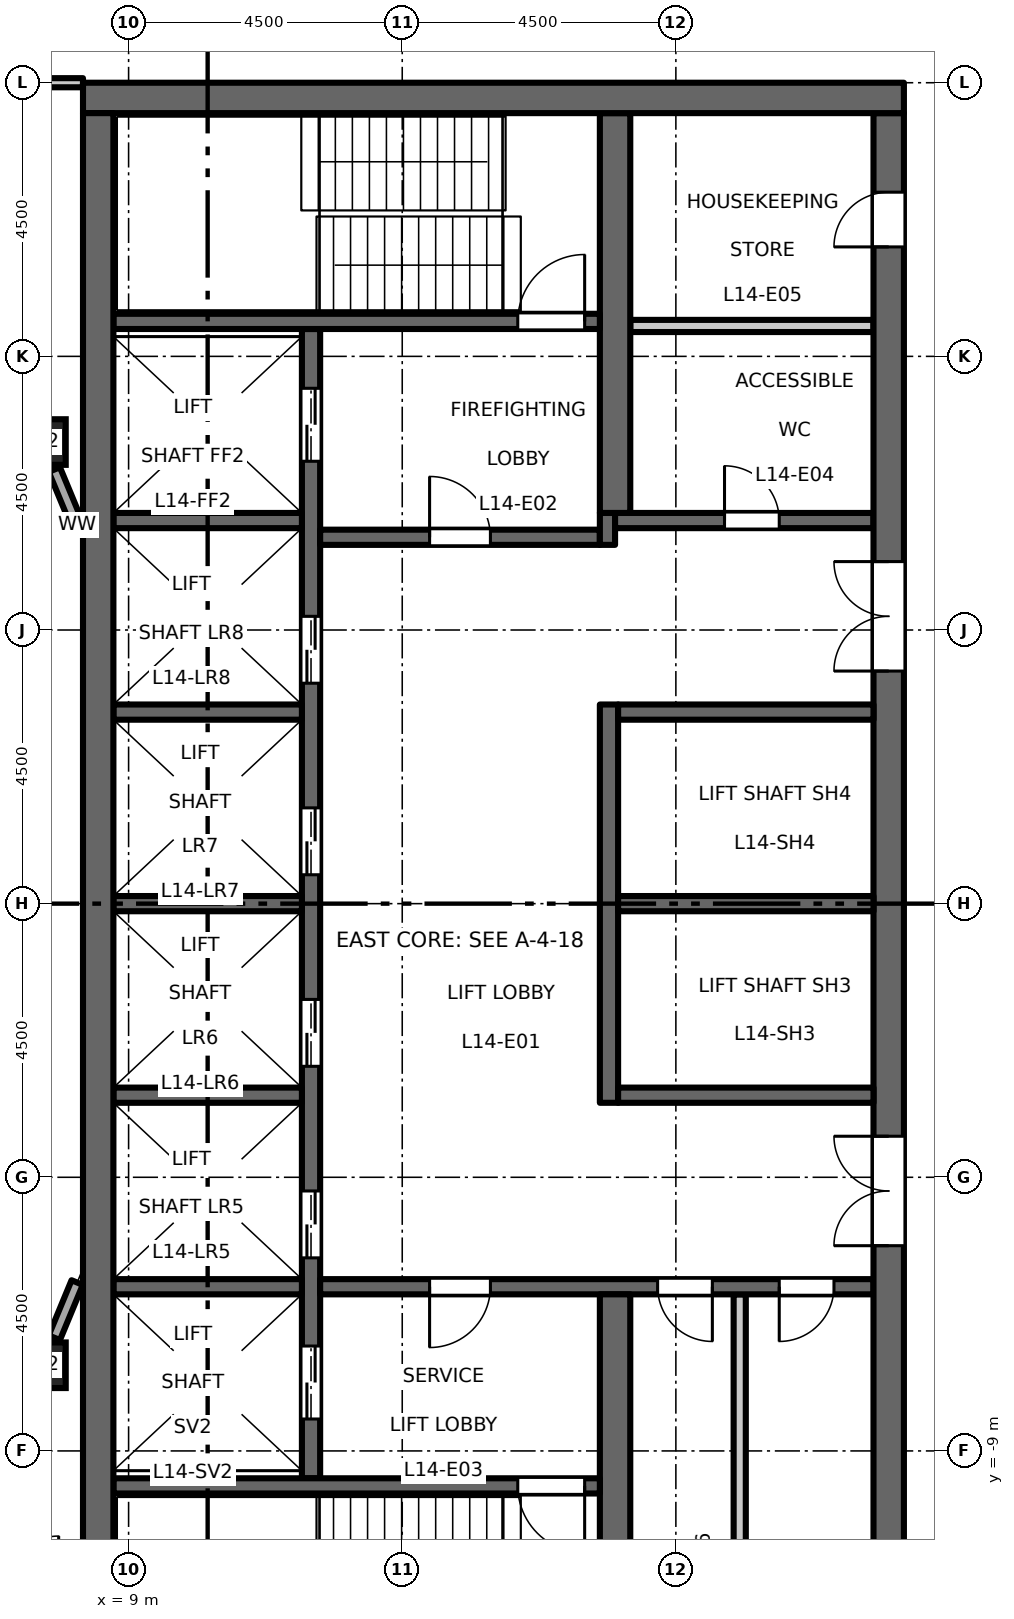
"""IFC4 building model, lengths in metres.
Left out: names, types, materials, properties, quantities, classifications, styles, units other than length and angle.
Written with IfcOpenShell. Run it as: python <this file> out.ifc"""

import sys

from ifc_helpers import new_model, si_unit, direction, frame, frame_2d, origin, origin_2d, place, context, subcontext, project, spatial, rectangle, hollow_rectangle, extrude, element, fill, save


model = new_model("IFC4")
c1 = context("Model", 3, precision=1e-05, world=origin(), true_north=direction((0.0, 1.0)))
c2 = subcontext(c1, "Body", "Model", "MODEL_VIEW")
j1 = project(units=[si_unit("LENGTHUNIT", "METRE"), si_unit("PLANEANGLEUNIT", "RADIAN")], contexts=[c1])
p1 = place(None, origin())
s1 = spatial("IfcSite", under=j1, at=p1, CompositionType="ELEMENT")
p2 = place(p1, origin())
s2 = spatial("IfcBuilding", under=s1, at=p2, CompositionType="ELEMENT")
p3 = place(p2, frame((0.0, 0.0, 67.2)))
s3 = spatial("IfcBuildingStorey", under=s2, at=p3, CompositionType="ELEMENT", Elevation=67.2)
for number, where, z_axis, x_axis in (
    (1, (7.591, -7.591, 0.0), (0.0, 0.0, 1.0), (1.0, 0.0, 0.0)),
    (2, (7.591, 7.591, 0.0), (0.0, 0.0, 1.0), (1.0, 0.0, 0.0)),
):
    element("IfcColumn", number, at=place(p3, frame(where, z_axis=z_axis, x_axis=x_axis)), inside=s3, PredefinedType="COLUMN", context=c2, shape_type="SweptSolid", body=[
        extrude(hollow_rectangle(XDim=0.75, YDim=0.75, WallThickness=0.045, at=origin_2d()), origin(), (0.0, 0.0, 1.0), 4.5),
    ])
p4 = place(p3, frame((12.0, -9.45, 0.0), z_axis=(0.0, 0.0, 1.0), x_axis=(0.0, 1.0, 0.0)))
e3 = element("IfcWall", 3, at=p4, inside=s3, PredefinedType="SHEAR", context=c2, shape_type="SweptSolid", body=[
    extrude(rectangle(XDim=18.9, YDim=0.3, at=frame_2d((9.45, 0.0))), origin(), (0.0, 0.0, 1.0), 4.35),
])
p5 = place(p4, frame((3.625, 0.0, 0.0)))
e4 = element("IfcOpeningElement", 4, at=p5, cuts=e3, PredefinedType="OPENING", context=c2, shape_type="SweptSolid", body=[
    extrude(rectangle(XDim=1.1, YDim=2.1, at=frame_2d((0.55, 1.05))), frame((0.0, 0.16, 0.0), z_axis=(0.0, -1.0, 0.0), x_axis=(1.0, 0.0, 0.0)), (0.0, 0.0, 1.0), 0.32),
])
p6 = place(p4, frame((6.775, 0.0, 0.0)))
e5 = element("IfcOpeningElement", 5, at=p6, cuts=e3, PredefinedType="OPENING", context=c2, shape_type="SweptSolid", body=[
    extrude(rectangle(XDim=1.1, YDim=2.1, at=frame_2d((0.55, 1.05))), frame((0.0, 0.16, 0.0), z_axis=(0.0, -1.0, 0.0), x_axis=(1.0, 0.0, 0.0)), (0.0, 0.0, 1.0), 0.32),
])
p7 = place(p4, frame((9.925, 0.0, 0.0)))
e6 = element("IfcOpeningElement", 6, at=p7, cuts=e3, PredefinedType="OPENING", context=c2, shape_type="SweptSolid", body=[
    extrude(rectangle(XDim=1.1, YDim=2.1, at=frame_2d((0.55, 1.05))), frame((0.0, 0.16, 0.0), z_axis=(0.0, -1.0, 0.0), x_axis=(1.0, 0.0, 0.0)), (0.0, 0.0, 1.0), 0.32),
])
p8 = place(p4, frame((13.075, 0.0, 0.0)))
e7 = element("IfcOpeningElement", 7, at=p8, cuts=e3, PredefinedType="OPENING", context=c2, shape_type="SweptSolid", body=[
    extrude(rectangle(XDim=1.1, YDim=2.1, at=frame_2d((0.55, 1.05))), frame((0.0, 0.16, 0.0), z_axis=(0.0, -1.0, 0.0), x_axis=(1.0, 0.0, 0.0)), (0.0, 0.0, 1.0), 0.32),
])
p9 = place(p4, frame((16.725, 0.0, 0.0)))
e8 = element("IfcOpeningElement", 8, at=p9, cuts=e3, PredefinedType="OPENING", context=c2, shape_type="SweptSolid", body=[
    extrude(rectangle(XDim=1.2, YDim=2.1, at=frame_2d((0.6, 1.05))), frame((0.0, 0.16, 0.0), z_axis=(0.0, -1.0, 0.0), x_axis=(1.0, 0.0, 0.0)), (0.0, 0.0, 1.0), 0.32),
])
p10 = place(p4, frame((0.975, 0.0, 0.0)))
e9 = element("IfcOpeningElement", 9, at=p10, cuts=e3, PredefinedType="OPENING", context=c2, shape_type="SweptSolid", body=[
    extrude(rectangle(XDim=1.2, YDim=2.1, at=frame_2d((0.6, 1.05))), frame((0.0, 0.16, 0.0), z_axis=(0.0, -1.0, 0.0), x_axis=(1.0, 0.0, 0.0)), (0.0, 0.0, 1.0), 0.32),
])
p11 = place(p3, frame((12.15, 6.025, 0.0), z_axis=(0.0, 0.0, 1.0), x_axis=(1.0, 0.0, 0.0)))
e10 = element("IfcWall", 10, at=p11, inside=s3, PredefinedType="SHEAR", context=c2, shape_type="SweptSolid", body=[
    extrude(rectangle(XDim=4.6, YDim=0.25, at=frame_2d((2.3, 0.0))), origin(), (0.0, 0.0, 1.0), 4.35),
])
p12 = place(p11, frame((1.8, 0.0, 0.0)))
e11 = element("IfcOpeningElement", 11, at=p12, cuts=e10, PredefinedType="OPENING", context=c2, shape_type="SweptSolid", body=[
    extrude(rectangle(XDim=1.0, YDim=2.1, at=frame_2d((0.5, 1.05))), frame((0.0, 0.135, 0.0), z_axis=(0.0, -1.0, 0.0), x_axis=(1.0, 0.0, 0.0)), (0.0, 0.0, 1.0), 0.27),
])
p13 = place(p3, frame((16.875, 5.9, 0.0), z_axis=(0.0, 0.0, 1.0), x_axis=(0.0, 1.0, 0.0)))
e12 = element("IfcWall", 12, at=p13, inside=s3, PredefinedType="SHEAR", context=c2, shape_type="SweptSolid", body=[
    extrude(rectangle(XDim=0.525, YDim=0.25, at=frame_2d((0.263, 0.0))), origin(), (0.0, 0.0, 1.0), 4.35),
])
p14 = place(p3, frame((17.0, 6.3, 0.0), z_axis=(0.0, 0.0, 1.0), x_axis=(1.0, 0.0, 0.0)))
e13 = element("IfcWall", 13, at=p14, inside=s3, PredefinedType="SHEAR", context=c2, shape_type="SweptSolid", body=[
    extrude(rectangle(XDim=4.25, YDim=0.25, at=frame_2d((2.125, 0.0))), origin(), (0.0, 0.0, 1.0), 4.35),
])
p15 = place(p14, frame((1.8, 0.0, 0.0)))
e14 = element("IfcOpeningElement", 14, at=p15, cuts=e13, PredefinedType="OPENING", context=c2, shape_type="SweptSolid", body=[
    extrude(rectangle(XDim=0.9, YDim=2.1, at=frame_2d((0.45, 1.05))), frame((0.0, 0.135, 0.0), z_axis=(0.0, -1.0, 0.0), x_axis=(1.0, 0.0, 0.0)), (0.0, 0.0, 1.0), 0.27),
])
p16 = place(p3, frame((12.15, -6.3, 0.0), z_axis=(0.0, 0.0, 1.0), x_axis=(1.0, 0.0, 0.0)))
e15 = element("IfcWall", 15, at=p16, inside=s3, PredefinedType="SHEAR", context=c2, shape_type="SweptSolid", body=[
    extrude(rectangle(XDim=9.1, YDim=0.25, at=frame_2d((4.55, 0.0))), origin(), (0.0, 0.0, 1.0), 4.35),
])
p17 = place(p16, frame((1.8, 0.0, 0.0)))
e16 = element("IfcOpeningElement", 16, at=p17, cuts=e15, PredefinedType="OPENING", context=c2, shape_type="SweptSolid", body=[
    extrude(rectangle(XDim=1.0, YDim=2.1, at=frame_2d((0.5, 1.05))), frame((0.0, 0.135, 0.0), z_axis=(0.0, -1.0, 0.0), x_axis=(1.0, 0.0, 0.0)), (0.0, 0.0, 1.0), 0.27),
])
p18 = place(p16, frame((5.55, 0.0, 0.0)))
e17 = element("IfcOpeningElement", 17, at=p18, cuts=e15, PredefinedType="OPENING", context=c2, shape_type="SweptSolid", body=[
    extrude(rectangle(XDim=0.9, YDim=2.1, at=frame_2d((0.45, 1.05))), frame((0.0, 0.135, 0.0), z_axis=(0.0, -1.0, 0.0), x_axis=(1.0, 0.0, 0.0)), (0.0, 0.0, 1.0), 0.27),
])
p19 = place(p16, frame((7.55, 0.0, 0.0)))
e18 = element("IfcOpeningElement", 18, at=p19, cuts=e15, PredefinedType="OPENING", context=c2, shape_type="SweptSolid", body=[
    extrude(rectangle(XDim=0.9, YDim=2.1, at=frame_2d((0.45, 1.05))), frame((0.0, 0.135, 0.0), z_axis=(0.0, -1.0, 0.0), x_axis=(1.0, 0.0, 0.0)), (0.0, 0.0, 1.0), 0.27),
])
p20 = place(p3, frame((21.5, -13.0, 0.0), z_axis=(0.0, 0.0, 1.0), x_axis=(0.0, 1.0, 0.0)))
e19 = element("IfcWall", 19, at=p20, inside=s3, PredefinedType="SHEAR", context=c2, shape_type="SweptSolid", body=[
    extrude(rectangle(XDim=26.0, YDim=0.5, at=frame_2d((13.0, 0.0))), origin(), (0.0, 0.0, 1.0), 4.35),
])
p21 = place(p20, frame((16.825, 0.0, 0.0)))
e20 = element("IfcOpeningElement", 20, at=p21, cuts=e19, PredefinedType="OPENING", context=c2, shape_type="SweptSolid", body=[
    extrude(rectangle(XDim=1.8, YDim=2.1, at=frame_2d((0.9, 1.05))), frame((0.0, 0.26, 0.0), z_axis=(0.0, -1.0, 0.0), x_axis=(1.0, 0.0, 0.0)), (0.0, 0.0, 1.0), 0.52),
])
p22 = place(p20, frame((7.375, 0.0, 0.0)))
e21 = element("IfcOpeningElement", 21, at=p22, cuts=e19, PredefinedType="OPENING", context=c2, shape_type="SweptSolid", body=[
    extrude(rectangle(XDim=1.8, YDim=2.1, at=frame_2d((0.9, 1.05))), frame((0.0, 0.26, 0.0), z_axis=(0.0, -1.0, 0.0), x_axis=(1.0, 0.0, 0.0)), (0.0, 0.0, 1.0), 0.52),
])
p23 = place(p20, frame((23.8, 0.0, 0.0)))
e22 = element("IfcOpeningElement", 22, at=p23, cuts=e19, PredefinedType="OPENING", context=c2, shape_type="SweptSolid", body=[
    extrude(rectangle(XDim=0.9, YDim=2.1, at=frame_2d((0.45, 1.05))), frame((0.0, 0.26, 0.0), z_axis=(0.0, -1.0, 0.0), x_axis=(1.0, 0.0, 0.0)), (0.0, 0.0, 1.0), 0.52),
])
p24 = place(p3, frame((17.25, 9.5, 0.0), z_axis=(0.0, 0.0, 1.0), x_axis=(1.0, 0.0, 0.0)))
e23 = element("IfcWall", 23, at=p24, inside=s3, PredefinedType="PARTITIONING", context=c2, shape_type="SweptSolid", body=[
    extrude(rectangle(XDim=4.0, YDim=0.2, at=frame_2d((2.0, 0.0))), origin(), (0.0, 0.0, 1.0), 4.35),
])
p25 = place(p3, frame((19.05, -13.0, 0.0), z_axis=(0.0, 0.0, 1.0), x_axis=(0.0, 1.0, 0.0)))
e24 = element("IfcWall", 24, at=p25, inside=s3, PredefinedType="PARTITIONING", context=c2, shape_type="SweptSolid", body=[
    extrude(rectangle(XDim=6.575, YDim=0.2, at=frame_2d((3.288, 0.0))), origin(), (0.0, 0.0, 1.0), 4.35),
])
p26 = place(p3, frame((16.9, -3.275, 0.0), z_axis=(0.0, 0.0, 1.0), x_axis=(0.0, 1.0, 0.0)))
e25 = element("IfcWall", 25, at=p26, inside=s3, PredefinedType="SHEAR", context=c2, shape_type="SweptSolid", body=[
    extrude(rectangle(XDim=6.55, YDim=0.3, at=frame_2d((3.275, 0.0))), origin(), (0.0, 0.0, 1.0), 4.35),
])
for number, where, z_axis, x_axis in (
    (26, (17.05, 0.0, 0.0), (0.0, 0.0, 1.0), (1.0, 0.0, 0.0)),
    (27, (17.05, 3.15, 0.0), (0.0, 0.0, 1.0), (1.0, 0.0, 0.0)),
    (28, (17.05, -3.15, 0.0), (0.0, 0.0, 1.0), (1.0, 0.0, 0.0)),
):
    element("IfcWall", number, at=place(p3, frame(where, z_axis=z_axis, x_axis=x_axis)), inside=s3, PredefinedType="SHEAR", context=c2, shape_type="SweptSolid", body=[
        extrude(rectangle(XDim=4.2, YDim=0.25, at=frame_2d((2.1, 0.0))), origin(), (0.0, 0.0, 1.0), 4.35),
    ])
for number, where, z_axis, x_axis in (
    (29, (17.0, 6.425, 0.0), (0.0, 0.0, 1.0), (0.0, 1.0, 0.0)),
    (30, (17.0, -13.0, 0.0), (0.0, 0.0, 1.0), (0.0, 1.0, 0.0)),
):
    element("IfcWall", number, at=place(p3, frame(where, z_axis=z_axis, x_axis=x_axis)), inside=s3, PredefinedType="SHEAR", context=c2, shape_type="SweptSolid", body=[
        extrude(rectangle(XDim=6.575, YDim=0.5, at=frame_2d((3.288, 0.0))), origin(), (0.0, 0.0, 1.0), 4.35),
    ])
for number, where, z_axis, x_axis in (
    (31, (8.75, 0.0, 0.0), (0.0, 0.0, 1.0), (1.0, 0.0, 0.0)),
    (32, (8.75, 3.15, 0.0), (0.0, 0.0, 1.0), (1.0, 0.0, 0.0)),
    (33, (8.75, 6.3, 0.0), (0.0, 0.0, 1.0), (1.0, 0.0, 0.0)),
    (34, (8.75, -3.15, 0.0), (0.0, 0.0, 1.0), (1.0, 0.0, 0.0)),
    (35, (8.75, -6.3, 0.0), (0.0, 0.0, 1.0), (1.0, 0.0, 0.0)),
):
    element("IfcWall", number, at=place(p3, frame(where, z_axis=z_axis, x_axis=x_axis)), inside=s3, PredefinedType="SHEAR", context=c2, shape_type="SweptSolid", body=[
        extrude(rectangle(XDim=3.1, YDim=0.25, at=frame_2d((1.55, 0.0))), origin(), (0.0, 0.0, 1.0), 4.35),
    ])
p27 = place(p3, frame((8.75, 9.575, 0.0), z_axis=(0.0, 0.0, 1.0), x_axis=(1.0, 0.0, 0.0)))
e36 = element("IfcWall", 36, at=p27, inside=s3, PredefinedType="SHEAR", context=c2, shape_type="SweptSolid", body=[
    extrude(rectangle(XDim=8.0, YDim=0.25, at=frame_2d((4.0, 0.0))), origin(), (0.0, 0.0, 1.0), 4.35),
])
p28 = place(p27, frame((6.65, 0.0, 0.0)))
e37 = element("IfcOpeningElement", 37, at=p28, cuts=e36, PredefinedType="OPENING", context=c2, shape_type="SweptSolid", body=[
    extrude(rectangle(XDim=1.1, YDim=2.1, at=frame_2d((0.55, 1.05))), frame((0.0, 0.135, 0.0), z_axis=(0.0, -1.0, 0.0), x_axis=(1.0, 0.0, 0.0)), (0.0, 0.0, 1.0), 0.27),
])
p29 = place(p3, frame((8.75, -9.575, 0.0), z_axis=(0.0, 0.0, 1.0), x_axis=(1.0, 0.0, 0.0)))
e38 = element("IfcWall", 38, at=p29, inside=s3, PredefinedType="SHEAR", context=c2, shape_type="SweptSolid", body=[
    extrude(rectangle(XDim=8.0, YDim=0.25, at=frame_2d((4.0, 0.0))), origin(), (0.0, 0.0, 1.0), 4.35),
])
p30 = place(p29, frame((6.65, 0.0, 0.0)))
e39 = element("IfcOpeningElement", 39, at=p30, cuts=e38, PredefinedType="OPENING", context=c2, shape_type="SweptSolid", body=[
    extrude(rectangle(XDim=1.1, YDim=2.1, at=frame_2d((0.55, 1.05))), frame((0.0, 0.135, 0.0), z_axis=(0.0, -1.0, 0.0), x_axis=(1.0, 0.0, 0.0)), (0.0, 0.0, 1.0), 0.27),
])
p31 = place(p3, frame((8.25, 13.25, 0.0), z_axis=(0.0, 0.0, 1.0), x_axis=(1.0, 0.0, 0.0)))
e40 = element("IfcWall", 40, at=p31, inside=s3, PredefinedType="SHEAR", context=c2, shape_type="SweptSolid", body=[
    extrude(rectangle(XDim=13.5, YDim=0.5, at=frame_2d((6.75, 0.0))), origin(), (0.0, 0.0, 1.0), 4.35),
])
p32 = place(p3, frame((8.5, -13.0, 0.0), z_axis=(0.0, 0.0, 1.0), x_axis=(0.0, 1.0, 0.0)))
e41 = element("IfcWall", 41, at=p32, inside=s3, PredefinedType="SHEAR", context=c2, shape_type="SweptSolid", body=[
    extrude(rectangle(XDim=26.0, YDim=0.5, at=frame_2d((13.0, 0.0))), origin(), (0.0, 0.0, 1.0), 4.35),
])
for number, where, z_axis, x_axis in (
    (42, (7.779, -7.138, 0.0), (0.0, 0.0, 1.0), (0.383, 0.924, 0.0)),
    (43, (8.154, 6.231, 0.0), (0.0, 0.0, 1.0), (-0.383, 0.924, 0.0)),
):
    element("IfcWall", number, at=place(p3, frame(where, z_axis=z_axis, x_axis=x_axis)), inside=s3, PredefinedType="STANDARD", context=c2, shape_type="SweptSolid", body=[
        extrude(rectangle(XDim=0.982, YDim=0.2, at=frame_2d((0.491, 0.0))), origin(), (0.0, 0.0, 1.0), 3.73),
    ])
p33 = place(p3, frame((-8.25, 13.5, 0.0), z_axis=(0.0, 0.0, 1.0), x_axis=(1.0, 0.0, 0.0)))
e44 = element("IfcWall", 44, at=p33, inside=s3, PredefinedType="PARTITIONING", context=c2, shape_type="SweptSolid", body=[
    extrude(rectangle(XDim=16.5, YDim=0.15, at=frame_2d((8.25, 0.0))), origin(), (0.0, 0.0, 1.0), 3.85),
])
p34 = place(p33, frame((2.15, 0.0, 0.0)))
e45 = element("IfcOpeningElement", 45, at=p34, cuts=e44, PredefinedType="OPENING", context=c2, shape_type="SweptSolid", body=[
    extrude(rectangle(XDim=1.0, YDim=2.1, at=frame_2d((0.5, 1.05))), frame((0.0, 0.085, 0.0), z_axis=(0.0, -1.0, 0.0), x_axis=(1.0, 0.0, 0.0)), (0.0, 0.0, 1.0), 0.17),
])
p35 = place(p33, frame((4.4, 0.0, 0.0)))
e46 = element("IfcOpeningElement", 46, at=p35, cuts=e44, PredefinedType="OPENING", context=c2, shape_type="SweptSolid", body=[
    extrude(rectangle(XDim=1.0, YDim=2.1, at=frame_2d((0.5, 1.05))), frame((0.0, 0.085, 0.0), z_axis=(0.0, -1.0, 0.0), x_axis=(1.0, 0.0, 0.0)), (0.0, 0.0, 1.0), 0.17),
])
p36 = place(p12, origin())
e47 = element("IfcDoor", 47, at=p36, inside=s3, OperationType="SINGLE_SWING_RIGHT", PredefinedType="DOOR", context=c2, shape_type="SweptSolid", body=[
    extrude(rectangle(XDim=1.0, YDim=2.1, at=frame_2d((0.5, 1.05))), frame((0.0, 0.025, 0.0), z_axis=(0.0, -1.0, 0.0), x_axis=(1.0, 0.0, 0.0)), (0.0, 0.0, 1.0), 0.05),
])
fill(e11, e47)
p37 = place(p17, origin())
e48 = element("IfcDoor", 48, at=p37, inside=s3, OperationType="SINGLE_SWING_LEFT", PredefinedType="DOOR", context=c2, shape_type="SweptSolid", body=[
    extrude(rectangle(XDim=1.0, YDim=2.1, at=frame_2d((0.5, 1.05))), frame((0.0, 0.025, 0.0), z_axis=(0.0, -1.0, 0.0), x_axis=(1.0, 0.0, 0.0)), (0.0, 0.0, 1.0), 0.05),
])
fill(e16, e48)
p38 = place(p28, origin())
e49 = element("IfcDoor", 49, at=p38, inside=s3, OperationType="SINGLE_SWING_LEFT", PredefinedType="DOOR", context=c2, shape_type="SweptSolid", body=[
    extrude(rectangle(XDim=1.1, YDim=2.1, at=frame_2d((0.55, 1.05))), frame((0.0, 0.025, 0.0), z_axis=(0.0, -1.0, 0.0), x_axis=(1.0, 0.0, 0.0)), (0.0, 0.0, 1.0), 0.05),
])
fill(e37, e49)
p39 = place(p30, origin())
e50 = element("IfcDoor", 50, at=p39, inside=s3, OperationType="SINGLE_SWING_RIGHT", PredefinedType="DOOR", context=c2, shape_type="SweptSolid", body=[
    extrude(rectangle(XDim=1.1, YDim=2.1, at=frame_2d((0.55, 1.05))), frame((0.0, 0.025, 0.0), z_axis=(0.0, -1.0, 0.0), x_axis=(1.0, 0.0, 0.0)), (0.0, 0.0, 1.0), 0.05),
])
fill(e39, e50)
p40 = place(p21, origin())
e51 = element("IfcDoor", 51, at=p40, inside=s3, OperationType="DOUBLE_DOOR_DOUBLE_SWING", PredefinedType="DOOR", context=c2, shape_type="SweptSolid", body=[
    extrude(rectangle(XDim=1.8, YDim=2.1, at=frame_2d((0.9, 1.05))), frame((0.0, 0.025, 0.0), z_axis=(0.0, -1.0, 0.0), x_axis=(1.0, 0.0, 0.0)), (0.0, 0.0, 1.0), 0.05),
])
fill(e20, e51)
p41 = place(p22, origin())
e52 = element("IfcDoor", 52, at=p41, inside=s3, OperationType="DOUBLE_DOOR_DOUBLE_SWING", PredefinedType="DOOR", context=c2, shape_type="SweptSolid", body=[
    extrude(rectangle(XDim=1.8, YDim=2.1, at=frame_2d((0.9, 1.05))), frame((0.0, 0.025, 0.0), z_axis=(0.0, -1.0, 0.0), x_axis=(1.0, 0.0, 0.0)), (0.0, 0.0, 1.0), 0.05),
])
fill(e21, e52)
p42 = place(p5, origin())
e53 = element("IfcDoor", 53, at=p42, inside=s3, OperationType="DOUBLE_DOOR_SLIDING", PredefinedType="DOOR", context=c2, shape_type="SweptSolid", body=[
    extrude(rectangle(XDim=1.1, YDim=2.1, at=frame_2d((0.55, 1.05))), frame((0.0, 0.025, 0.0), z_axis=(0.0, -1.0, 0.0), x_axis=(1.0, 0.0, 0.0)), (0.0, 0.0, 1.0), 0.05),
])
fill(e4, e53)
p43 = place(p6, origin())
e54 = element("IfcDoor", 54, at=p43, inside=s3, OperationType="DOUBLE_DOOR_SLIDING", PredefinedType="DOOR", context=c2, shape_type="SweptSolid", body=[
    extrude(rectangle(XDim=1.1, YDim=2.1, at=frame_2d((0.55, 1.05))), frame((0.0, 0.025, 0.0), z_axis=(0.0, -1.0, 0.0), x_axis=(1.0, 0.0, 0.0)), (0.0, 0.0, 1.0), 0.05),
])
fill(e5, e54)
p44 = place(p7, origin())
e55 = element("IfcDoor", 55, at=p44, inside=s3, OperationType="DOUBLE_DOOR_SLIDING", PredefinedType="DOOR", context=c2, shape_type="SweptSolid", body=[
    extrude(rectangle(XDim=1.1, YDim=2.1, at=frame_2d((0.55, 1.05))), frame((0.0, 0.025, 0.0), z_axis=(0.0, -1.0, 0.0), x_axis=(1.0, 0.0, 0.0)), (0.0, 0.0, 1.0), 0.05),
])
fill(e6, e55)
p45 = place(p8, origin())
e56 = element("IfcDoor", 56, at=p45, inside=s3, OperationType="DOUBLE_DOOR_SLIDING", PredefinedType="DOOR", context=c2, shape_type="SweptSolid", body=[
    extrude(rectangle(XDim=1.1, YDim=2.1, at=frame_2d((0.55, 1.05))), frame((0.0, 0.025, 0.0), z_axis=(0.0, -1.0, 0.0), x_axis=(1.0, 0.0, 0.0)), (0.0, 0.0, 1.0), 0.05),
])
fill(e7, e56)
p46 = place(p9, origin())
e57 = element("IfcDoor", 57, at=p46, inside=s3, OperationType="DOUBLE_DOOR_SLIDING", PredefinedType="DOOR", context=c2, shape_type="SweptSolid", body=[
    extrude(rectangle(XDim=1.2, YDim=2.1, at=frame_2d((0.6, 1.05))), frame((0.0, 0.025, 0.0), z_axis=(0.0, -1.0, 0.0), x_axis=(1.0, 0.0, 0.0)), (0.0, 0.0, 1.0), 0.05),
])
fill(e8, e57)
p47 = place(p10, origin())
e58 = element("IfcDoor", 58, at=p47, inside=s3, OperationType="DOUBLE_DOOR_SLIDING", PredefinedType="DOOR", context=c2, shape_type="SweptSolid", body=[
    extrude(rectangle(XDim=1.2, YDim=2.1, at=frame_2d((0.6, 1.05))), frame((0.0, 0.025, 0.0), z_axis=(0.0, -1.0, 0.0), x_axis=(1.0, 0.0, 0.0)), (0.0, 0.0, 1.0), 0.05),
])
fill(e9, e58)
p48 = place(p15, origin())
e59 = element("IfcDoor", 59, at=p48, inside=s3, OperationType="SINGLE_SWING_RIGHT", PredefinedType="DOOR", context=c2, shape_type="SweptSolid", body=[
    extrude(rectangle(XDim=0.9, YDim=2.1, at=frame_2d((0.45, 1.05))), frame((0.0, 0.025, 0.0), z_axis=(0.0, -1.0, 0.0), x_axis=(1.0, 0.0, 0.0)), (0.0, 0.0, 1.0), 0.05),
])
fill(e14, e59)
p49 = place(p23, origin())
e60 = element("IfcDoor", 60, at=p49, inside=s3, OperationType="SINGLE_SWING_RIGHT", PredefinedType="DOOR", context=c2, shape_type="SweptSolid", body=[
    extrude(rectangle(XDim=0.9, YDim=2.1, at=frame_2d((0.45, 1.05))), frame((0.0, 0.025, 0.0), z_axis=(0.0, -1.0, 0.0), x_axis=(1.0, 0.0, 0.0)), (0.0, 0.0, 1.0), 0.05),
])
fill(e22, e60)
p50 = place(p18, origin())
e61 = element("IfcDoor", 61, at=p50, inside=s3, OperationType="SINGLE_SWING_RIGHT", PredefinedType="DOOR", context=c2, shape_type="SweptSolid", body=[
    extrude(rectangle(XDim=0.9, YDim=2.1, at=frame_2d((0.45, 1.05))), frame((0.0, 0.025, 0.0), z_axis=(0.0, -1.0, 0.0), x_axis=(1.0, 0.0, 0.0)), (0.0, 0.0, 1.0), 0.05),
])
fill(e17, e61)
p51 = place(p19, origin())
e62 = element("IfcDoor", 62, at=p51, inside=s3, OperationType="SINGLE_SWING_LEFT", PredefinedType="DOOR", context=c2, shape_type="SweptSolid", body=[
    extrude(rectangle(XDim=0.9, YDim=2.1, at=frame_2d((0.45, 1.05))), frame((0.0, 0.025, 0.0), z_axis=(0.0, -1.0, 0.0), x_axis=(1.0, 0.0, 0.0)), (0.0, 0.0, 1.0), 0.05),
])
fill(e18, e62)
save(model, sys.argv[1])
